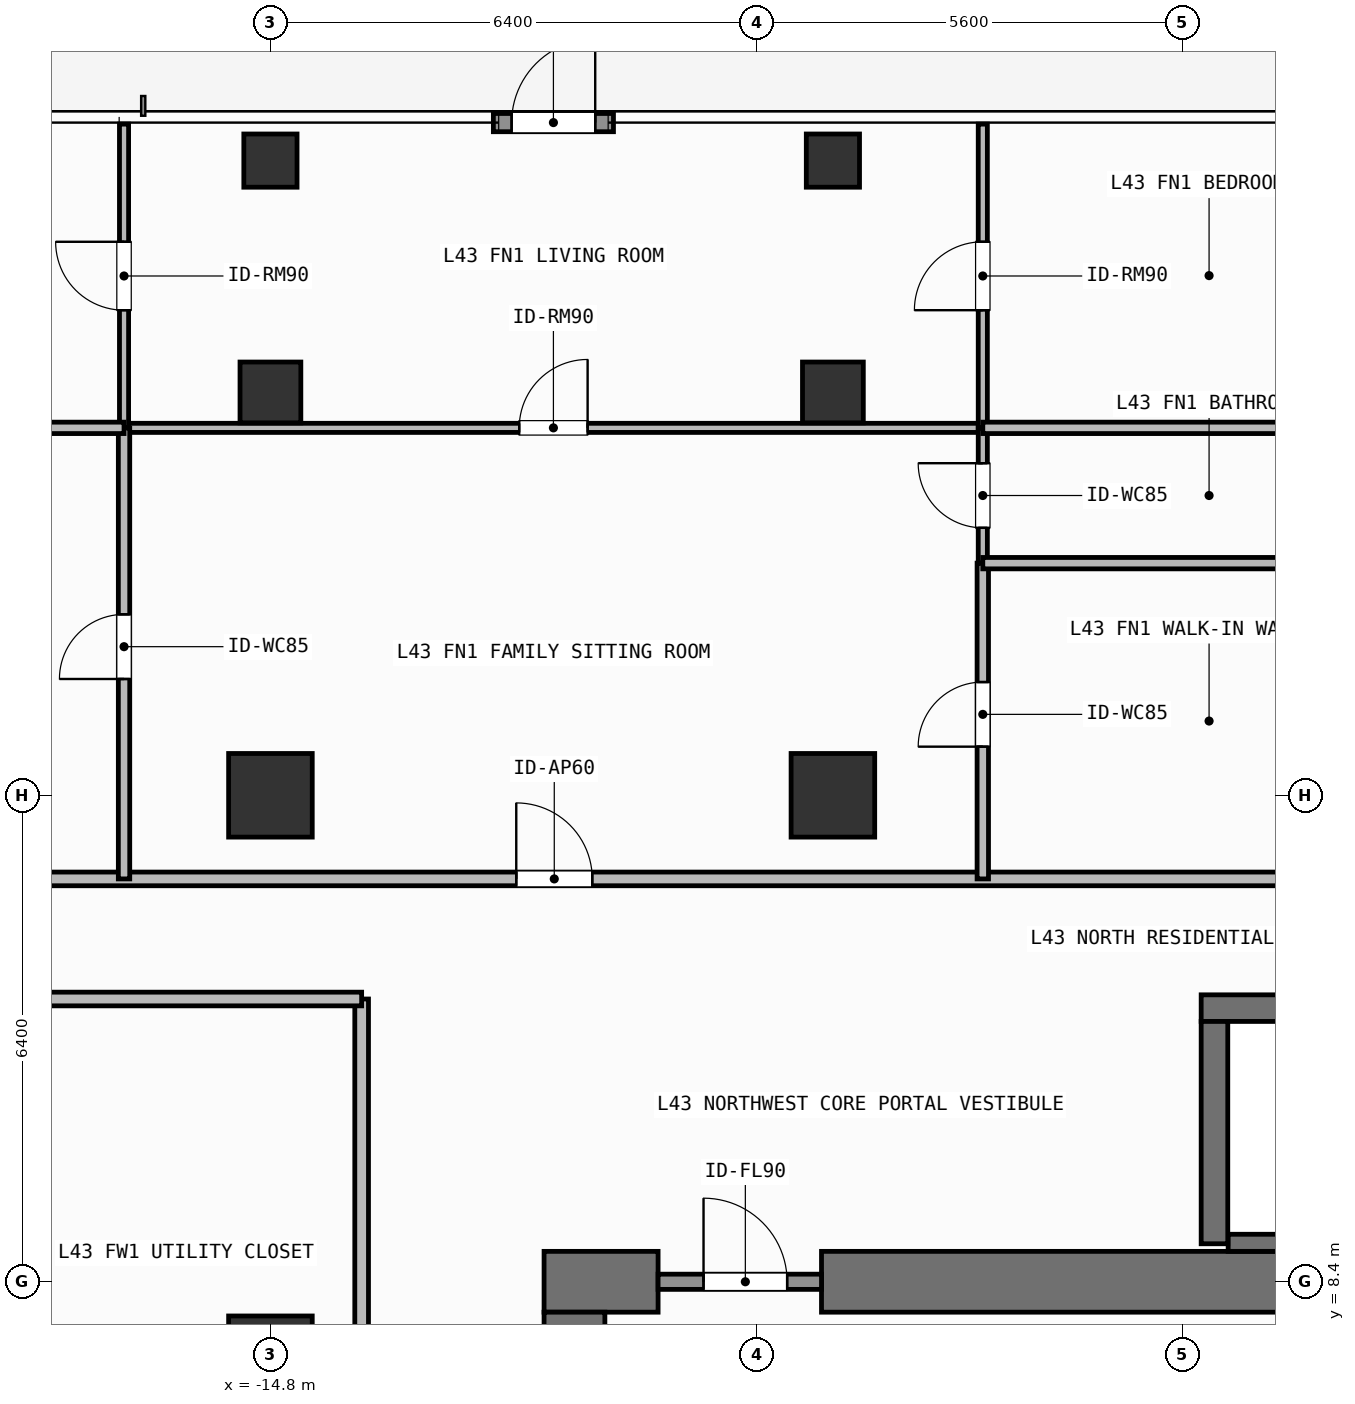
"""IFC4 building model, lengths in metres.
Left out: names, types, materials, properties, quantities, classifications, styles, units other than length and angle.
Written with IfcOpenShell. Run it as: python <this file> out.ifc"""

import sys

from ifc_helpers import new_model, si_unit, direction, frame, frame_2d, origin, origin_2d, place, context, subcontext, project, spatial, rectangle, hollow_rectangle, extrude, element, fill, save


model = new_model("IFC4")
c1 = context("Model", 3, precision=1e-05, world=origin(), true_north=direction((0.0, 1.0)))
c2 = subcontext(c1, "Body", "Model", "MODEL_VIEW")
j1 = project(units=[si_unit("LENGTHUNIT", "METRE"), si_unit("PLANEANGLEUNIT", "RADIAN")], contexts=[c1])
p1 = place(None, origin())
s1 = spatial("IfcSite", under=j1, at=p1, CompositionType="ELEMENT")
p2 = place(p1, origin())
s2 = spatial("IfcBuilding", under=s1, at=p2, CompositionType="ELEMENT")
p3 = place(p2, frame((0.0, 0.0, 175.8)))
s3 = spatial("IfcBuildingStorey", under=s2, at=p3, CompositionType="ELEMENT", Elevation=175.8)
p4 = place(p3, frame((-11.2, 8.4, 0.0), z_axis=(0.0, 0.0, 1.0), x_axis=(1.0, 0.0, 0.0)))
e1 = element("IfcWall", 1, at=p4, inside=s3, PredefinedType="SHEAR", context=c2, shape_type="SweptSolid", body=[
    extrude(rectangle(XDim=1.5, YDim=0.8, at=frame_2d((0.75, 0.0))), origin(), (0.0, 0.0, 1.0), 3.9),
])
p5 = place(p3, frame((-7.55, 8.4, 0.0), z_axis=(0.0, 0.0, 1.0), x_axis=(1.0, 0.0, 0.0)))
e2 = element("IfcWall", 2, at=p5, inside=s3, PredefinedType="SHEAR", context=c2, shape_type="SweptSolid", body=[
    extrude(rectangle(XDim=16.35, YDim=0.8, at=frame_2d((8.175, 0.0))), origin(), (0.0, 0.0, 1.0), 3.9),
])
p6 = place(p3, frame((-10.8, -8.0, 0.0), z_axis=(0.0, 0.0, 1.0), x_axis=(0.0, 1.0, 0.0)))
e3 = element("IfcWall", 3, at=p6, inside=s3, PredefinedType="SHEAR", context=c2, shape_type="SweptSolid", body=[
    extrude(rectangle(XDim=16.0, YDim=0.8, at=frame_2d((8.0, 0.0))), origin(), (0.0, 0.0, 1.0), 3.9),
])
p7 = place(p3, frame((-2.555, 12.0, 0.0), z_axis=(0.0, 0.0, 1.0), x_axis=(1.0, 0.0, 0.0)))
e4 = element("IfcWall", 4, at=p7, inside=s3, PredefinedType="SHEAR", context=c2, shape_type="SweptSolid", body=[
    extrude(rectangle(XDim=7.31, YDim=0.35, at=frame_2d((3.655, 0.0))), origin(), (0.0, 0.0, 1.0), 3.9),
])
p8 = place(p3, frame((-2.2, 8.913, 0.0), z_axis=(0.0, 0.0, 1.0), x_axis=(1.0, 0.0, 0.0)))
e5 = element("IfcWall", 5, at=p8, inside=s3, PredefinedType="SHEAR", context=c2, shape_type="SweptSolid", body=[
    extrude(rectangle(XDim=6.6, YDim=0.225, at=frame_2d((3.3, 0.0))), origin(), (0.0, 0.0, 1.0), 3.9),
])
p9 = place(p3, frame((-2.38, 8.9, 0.0), z_axis=(0.0, 0.0, 1.0), x_axis=(0.0, 1.0, 0.0)))
e6 = element("IfcWall", 6, at=p9, inside=s3, PredefinedType="SHEAR", context=c2, shape_type="SweptSolid", body=[
    extrude(rectangle(XDim=2.925, YDim=0.35, at=frame_2d((1.462, 0.0))), origin(), (0.0, 0.0, 1.0), 3.9),
])
for number, where, z_axis, x_axis in (
    (7, (-14.8, 14.8, 0.0), (0.0, 0.0, 1.0), (1.0, 0.0, 0.0)),
    (8, (-7.4, 14.8, 0.0), (0.0, 0.0, 1.0), (1.0, 0.0, 0.0)),
    (9, (-14.8, 7.4, 0.0), (0.0, 0.0, 1.0), (1.0, 0.0, 0.0)),
):
    element("IfcColumn", number, at=place(p3, frame(where, z_axis=z_axis, x_axis=x_axis)), inside=s3, PredefinedType="COLUMN", context=c2, shape_type="SweptSolid", body=[
        extrude(rectangle(XDim=1.1, YDim=1.1, at=origin_2d()), origin(), (0.0, 0.0, 1.0), 3.9),
    ])
for number, where, z_axis, x_axis in (
    (10, (-14.8, 20.1, 0.0), (0.0, 0.0, 1.0), (1.0, 0.0, 0.0)),
    (11, (-7.4, 20.1, 0.0), (0.0, 0.0, 1.0), (1.0, 0.0, 0.0)),
):
    element("IfcColumn", number, at=place(p3, frame(where, z_axis=z_axis, x_axis=x_axis)), inside=s3, PredefinedType="COLUMN", context=c2, shape_type="SweptSolid", body=[
        extrude(hollow_rectangle(XDim=0.8, YDim=0.8, WallThickness=0.036, at=origin_2d()), origin(), (0.0, 0.0, 1.0), 3.9),
    ])
for number, where, z_axis, x_axis in (
    (12, (-14.8, 23.15, 0.0), (0.0, 0.0, 1.0), (1.0, 0.0, 0.0)),
    (13, (-7.4, 23.15, 0.0), (0.0, 0.0, 1.0), (1.0, 0.0, 0.0)),
):
    element("IfcColumn", number, at=place(p3, frame(where, z_axis=z_axis, x_axis=x_axis)), inside=s3, PredefinedType="COLUMN", context=c2, shape_type="SweptSolid", body=[
        extrude(hollow_rectangle(XDim=0.7, YDim=0.7, WallThickness=0.032, at=origin_2d()), origin(), (0.0, 0.0, 1.0), 3.9),
    ])
p10 = place(p3, frame((-11.867, 23.65, 0.0), z_axis=(0.0, 0.0, 1.0), x_axis=(1.0, 0.0, 0.0)))
e14 = element("IfcWall", 14, at=p10, inside=s3, PredefinedType="SOLIDWALL", context=c2, shape_type="SweptSolid", body=[
    extrude(rectangle(XDim=1.58, YDim=0.24, at=frame_2d((0.79, 0.0))), origin(), (0.0, 0.0, 1.0), 3.68),
])
p11 = place(p10, frame((0.24, 0.0, 0.0)))
e15 = element("IfcOpeningElement", 15, at=p11, cuts=e14, PredefinedType="OPENING", context=c2, shape_type="SweptSolid", body=[
    extrude(rectangle(XDim=1.1, YDim=2.2, at=frame_2d((0.55, 1.1))), frame((0.0, 0.13, 0.0), z_axis=(0.0, -1.0, 0.0), x_axis=(1.0, 0.0, 0.0)), (0.0, 0.0, 1.0), 0.26),
])
p12 = place(p3, frame((-9.7, 8.4, 0.0), z_axis=(0.0, 0.0, 1.0), x_axis=(1.0, 0.0, 0.0)))
e16 = element("IfcWall", 16, at=p12, inside=s3, PredefinedType="SOLIDWALL", context=c2, shape_type="SweptSolid", body=[
    extrude(rectangle(XDim=2.15, YDim=0.2, at=frame_2d((1.075, 0.0))), origin(), (0.0, 0.0, 1.0), 2.82),
])
p13 = place(p12, frame((0.598, 0.0, 0.0)))
e17 = element("IfcOpeningElement", 17, at=p13, cuts=e16, PredefinedType="OPENING", context=c2, shape_type="SweptSolid", body=[
    extrude(rectangle(XDim=1.1, YDim=2.15, at=frame_2d((0.55, 1.075))), frame((0.0, 0.11, 0.0), z_axis=(0.0, -1.0, 0.0), x_axis=(1.0, 0.0, 0.0)), (0.0, 0.0, 1.0), 0.22),
])
p14 = place(p3, frame((-22.12, 13.7, 0.0), z_axis=(0.0, 0.0, 1.0), x_axis=(1.0, 0.0, 0.0)))
e18 = element("IfcWall", 18, at=p14, inside=s3, PredefinedType="PARTITIONING", context=c2, shape_type="SweptSolid", body=[
    extrude(rectangle(XDim=22.646, YDim=0.18, at=frame_2d((11.323, 0.0))), origin(), (0.0, 0.0, 1.0), 3.68),
])
p15 = place(p14, frame((10.554, 0.0, 0.0)))
e19 = element("IfcOpeningElement", 19, at=p15, cuts=e18, PredefinedType="OPENING", context=c2, shape_type="SweptSolid", body=[
    extrude(rectangle(XDim=1.0, YDim=2.2, at=frame_2d((0.5, 1.1))), frame((0.0, 0.1, 0.0), z_axis=(0.0, -1.0, 0.0), x_axis=(1.0, 0.0, 0.0)), (0.0, 0.0, 1.0), 0.2),
])
p16 = place(p3, frame((-16.726, 19.634, 0.0), z_axis=(0.0, 0.0, 1.0), x_axis=(1.0, 0.0, 0.0)))
e20 = element("IfcWall", 20, at=p16, inside=s3, PredefinedType="PARTITIONING", context=c2, shape_type="SweptSolid", body=[
    extrude(rectangle(XDim=11.298, YDim=0.12, at=frame_2d((5.649, 0.0))), origin(), (0.0, 0.0, 1.0), 3.68),
])
p17 = place(p16, frame((5.199, 0.0, 0.0)))
e21 = element("IfcOpeningElement", 21, at=p17, cuts=e20, PredefinedType="OPENING", context=c2, shape_type="SweptSolid", body=[
    extrude(rectangle(XDim=0.9, YDim=2.1, at=frame_2d((0.45, 1.05))), frame((0.0, 0.07, 0.0), z_axis=(0.0, -1.0, 0.0), x_axis=(1.0, 0.0, 0.0)), (0.0, 0.0, 1.0), 0.14),
])
p18 = place(p3, frame((-16.726, 13.7, 0.0), z_axis=(0.0, 0.0, 1.0), x_axis=(0.0, 1.0, 0.0)))
e22 = element("IfcWall", 22, at=p18, inside=s3, PredefinedType="PARTITIONING", context=c2, shape_type="SweptSolid", body=[
    extrude(rectangle(XDim=5.934, YDim=0.15, at=frame_2d((2.967, 0.0))), origin(), (0.0, 0.0, 1.0), 3.68),
])
p19 = place(p18, frame((2.63, 0.0, 0.0)))
e23 = element("IfcOpeningElement", 23, at=p19, cuts=e22, PredefinedType="OPENING", context=c2, shape_type="SweptSolid", body=[
    extrude(rectangle(XDim=0.85, YDim=2.1, at=frame_2d((0.425, 1.05))), frame((0.0, 0.085, 0.0), z_axis=(0.0, -1.0, 0.0), x_axis=(1.0, 0.0, 0.0)), (0.0, 0.0, 1.0), 0.17),
])
p20 = place(p3, frame((-16.726, 19.634, 0.0), z_axis=(0.0, 0.0, 1.0), x_axis=(0.0, 1.0, 0.0)))
e24 = element("IfcWall", 24, at=p20, inside=s3, PredefinedType="PARTITIONING", context=c2, shape_type="SweptSolid", body=[
    extrude(rectangle(XDim=3.996, YDim=0.12, at=frame_2d((1.998, 0.0))), origin(), (0.0, 0.0, 1.0), 3.68),
])
p21 = place(p20, frame((1.548, 0.0, 0.0)))
e25 = element("IfcOpeningElement", 25, at=p21, cuts=e24, PredefinedType="OPENING", context=c2, shape_type="SweptSolid", body=[
    extrude(rectangle(XDim=0.9, YDim=2.1, at=frame_2d((0.45, 1.05))), frame((0.0, 0.07, 0.0), z_axis=(0.0, -1.0, 0.0), x_axis=(1.0, 0.0, 0.0)), (0.0, 0.0, 1.0), 0.14),
])
p22 = place(p3, frame((-5.428, 13.7, 0.0), z_axis=(0.0, 0.0, 1.0), x_axis=(0.0, 1.0, 0.0)))
e26 = element("IfcWall", 26, at=p22, inside=s3, PredefinedType="PARTITIONING", context=c2, shape_type="SweptSolid", body=[
    extrude(rectangle(XDim=4.154, YDim=0.15, at=frame_2d((2.077, 0.0))), origin(), (0.0, 0.0, 1.0), 3.68),
])
p23 = place(p22, frame((1.74, 0.0, 0.0)))
e27 = element("IfcOpeningElement", 27, at=p23, cuts=e26, PredefinedType="OPENING", context=c2, shape_type="SweptSolid", body=[
    extrude(rectangle(XDim=0.85, YDim=2.1, at=frame_2d((0.425, 1.05))), frame((0.0, 0.085, 0.0), z_axis=(0.0, -1.0, 0.0), x_axis=(1.0, 0.0, 0.0)), (0.0, 0.0, 1.0), 0.17),
])
p24 = place(p3, frame((-5.428, 17.854, 0.0), z_axis=(0.0, 0.0, 1.0), x_axis=(0.0, 1.0, 0.0)))
e28 = element("IfcWall", 28, at=p24, inside=s3, PredefinedType="PARTITIONING", context=c2, shape_type="SweptSolid", body=[
    extrude(rectangle(XDim=1.78, YDim=0.12, at=frame_2d((0.89, 0.0))), origin(), (0.0, 0.0, 1.0), 3.68),
])
p25 = place(p24, frame((0.465, 0.0, 0.0)))
e29 = element("IfcOpeningElement", 29, at=p25, cuts=e28, PredefinedType="OPENING", context=c2, shape_type="SweptSolid", body=[
    extrude(rectangle(XDim=0.85, YDim=2.1, at=frame_2d((0.425, 1.05))), frame((0.0, 0.07, 0.0), z_axis=(0.0, -1.0, 0.0), x_axis=(1.0, 0.0, 0.0)), (0.0, 0.0, 1.0), 0.14),
])
p26 = place(p3, frame((-5.428, 19.634, 0.0), z_axis=(0.0, 0.0, 1.0), x_axis=(0.0, 1.0, 0.0)))
e30 = element("IfcWall", 30, at=p26, inside=s3, PredefinedType="PARTITIONING", context=c2, shape_type="SweptSolid", body=[
    extrude(rectangle(XDim=3.996, YDim=0.12, at=frame_2d((1.998, 0.0))), origin(), (0.0, 0.0, 1.0), 3.68),
])
p27 = place(p26, frame((1.548, 0.0, 0.0)))
e31 = element("IfcOpeningElement", 31, at=p27, cuts=e30, PredefinedType="OPENING", context=c2, shape_type="SweptSolid", body=[
    extrude(rectangle(XDim=0.9, YDim=2.1, at=frame_2d((0.45, 1.05))), frame((0.0, 0.07, 0.0), z_axis=(0.0, -1.0, 0.0), x_axis=(1.0, 0.0, 0.0)), (0.0, 0.0, 1.0), 0.14),
])
p28 = place(p3, frame((-13.6, -12.12, 0.0), z_axis=(0.0, 0.0, 1.0), x_axis=(0.0, 1.0, 0.0)))
e32 = element("IfcWall", 32, at=p28, inside=s3, PredefinedType="PARTITIONING", context=c2, shape_type="SweptSolid", body=[
    extrude(rectangle(XDim=24.24, YDim=0.18, at=frame_2d((12.12, 0.0))), origin(), (0.0, 0.0, 1.0), 3.68),
])
p29 = place(p28, frame((11.62, 0.0, 0.0)))
e33 = element("IfcOpeningElement", 33, at=p29, cuts=e32, PredefinedType="OPENING", context=c2, shape_type="SweptSolid", body=[
    extrude(rectangle(XDim=1.0, YDim=2.2, at=frame_2d((0.5, 1.1))), frame((0.0, 0.1, 0.0), z_axis=(0.0, -1.0, 0.0), x_axis=(1.0, 0.0, 0.0)), (0.0, 0.0, 1.0), 0.2),
])
p30 = place(p3, frame((-22.12, 19.634, 0.0), z_axis=(0.0, 0.0, 1.0), x_axis=(1.0, 0.0, 0.0)))
e34 = element("IfcWall", 34, at=p30, inside=s3, PredefinedType="PARTITIONING", context=c2, shape_type="SweptSolid", body=[
    extrude(rectangle(XDim=5.394, YDim=0.15, at=frame_2d((2.697, 0.0))), origin(), (0.0, 0.0, 1.0), 3.68),
])
for number, where, z_axis, x_axis in (
    (35, (-5.428, 17.854, 0.0), (0.0, 0.0, 1.0), (1.0, 0.0, 0.0)),
    (36, (-5.428, 19.634, 0.0), (0.0, 0.0, 1.0), (1.0, 0.0, 0.0)),
):
    element("IfcWall", number, at=place(p3, frame(where, z_axis=z_axis, x_axis=x_axis)), inside=s3, PredefinedType="PARTITIONING", context=c2, shape_type="SweptSolid", body=[
        extrude(rectangle(XDim=5.954, YDim=0.15, at=frame_2d((2.977, 0.0))), origin(), (0.0, 0.0, 1.0), 3.68),
    ])
p31 = place(p3, frame((-25.53, 12.12, 0.0), z_axis=(0.0, 0.0, 1.0), x_axis=(1.0, 0.0, 0.0)))
e37 = element("IfcWall", 37, at=p31, inside=s3, PredefinedType="PARTITIONING", context=c2, shape_type="SweptSolid", body=[
    extrude(rectangle(XDim=11.93, YDim=0.18, at=frame_2d((5.965, 0.0))), origin(), (0.0, 0.0, 1.0), 3.68),
])
p32 = place(p11, origin())
e38 = element("IfcDoor", 38, at=p32, inside=s3, OperationType="SINGLE_SWING_RIGHT", PredefinedType="DOOR", context=c2, shape_type="SweptSolid", body=[
    extrude(rectangle(XDim=1.1, YDim=2.2, at=frame_2d((0.55, 1.1))), frame((0.0, 0.025, 0.0), z_axis=(0.0, -1.0, 0.0), x_axis=(1.0, 0.0, 0.0)), (0.0, 0.0, 1.0), 0.05),
])
fill(e15, e38)
p33 = place(p13, origin())
e39 = element("IfcDoor", 39, at=p33, inside=s3, OperationType="SINGLE_SWING_LEFT", PredefinedType="DOOR", context=c2, shape_type="SweptSolid", body=[
    extrude(rectangle(XDim=1.1, YDim=2.15, at=frame_2d((0.55, 1.075))), frame((0.0, 0.025, 0.0), z_axis=(0.0, -1.0, 0.0), x_axis=(1.0, 0.0, 0.0)), (0.0, 0.0, 1.0), 0.05),
])
fill(e17, e39)
p34 = place(p15, origin())
e40 = element("IfcDoor", 40, at=p34, inside=s3, OperationType="SINGLE_SWING_LEFT", PredefinedType="DOOR", context=c2, shape_type="SweptSolid", body=[
    extrude(rectangle(XDim=1.0, YDim=2.2, at=frame_2d((0.5, 1.1))), frame((0.0, 0.025, 0.0), z_axis=(0.0, -1.0, 0.0), x_axis=(1.0, 0.0, 0.0)), (0.0, 0.0, 1.0), 0.05),
])
fill(e19, e40)
p35 = place(p17, origin())
e41 = element("IfcDoor", 41, at=p35, inside=s3, OperationType="SINGLE_SWING_RIGHT", PredefinedType="DOOR", context=c2, shape_type="SweptSolid", body=[
    extrude(rectangle(XDim=0.9, YDim=2.1, at=frame_2d((0.45, 1.05))), frame((0.0, 0.025, 0.0), z_axis=(0.0, -1.0, 0.0), x_axis=(1.0, 0.0, 0.0)), (0.0, 0.0, 1.0), 0.05),
])
fill(e21, e41)
p36 = place(p19, origin())
e42 = element("IfcDoor", 42, at=p36, inside=s3, OperationType="SINGLE_SWING_LEFT", PredefinedType="DOOR", context=c2, shape_type="SweptSolid", body=[
    extrude(rectangle(XDim=0.85, YDim=2.1, at=frame_2d((0.425, 1.05))), frame((0.0, 0.025, 0.0), z_axis=(0.0, -1.0, 0.0), x_axis=(1.0, 0.0, 0.0)), (0.0, 0.0, 1.0), 0.05),
])
fill(e23, e42)
p37 = place(p21, origin())
e43 = element("IfcDoor", 43, at=p37, inside=s3, OperationType="SINGLE_SWING_RIGHT", PredefinedType="DOOR", context=c2, shape_type="SweptSolid", body=[
    extrude(rectangle(XDim=0.9, YDim=2.1, at=frame_2d((0.45, 1.05))), frame((0.0, 0.025, 0.0), z_axis=(0.0, -1.0, 0.0), x_axis=(1.0, 0.0, 0.0)), (0.0, 0.0, 1.0), 0.05),
])
fill(e25, e43)
p38 = place(p23, origin())
e44 = element("IfcDoor", 44, at=p38, inside=s3, OperationType="SINGLE_SWING_LEFT", PredefinedType="DOOR", context=c2, shape_type="SweptSolid", body=[
    extrude(rectangle(XDim=0.85, YDim=2.1, at=frame_2d((0.425, 1.05))), frame((0.0, 0.025, 0.0), z_axis=(0.0, -1.0, 0.0), x_axis=(1.0, 0.0, 0.0)), (0.0, 0.0, 1.0), 0.05),
])
fill(e27, e44)
p39 = place(p25, origin())
e45 = element("IfcDoor", 45, at=p39, inside=s3, OperationType="SINGLE_SWING_RIGHT", PredefinedType="DOOR", context=c2, shape_type="SweptSolid", body=[
    extrude(rectangle(XDim=0.85, YDim=2.1, at=frame_2d((0.425, 1.05))), frame((0.0, 0.025, 0.0), z_axis=(0.0, -1.0, 0.0), x_axis=(1.0, 0.0, 0.0)), (0.0, 0.0, 1.0), 0.05),
])
fill(e29, e45)
p40 = place(p27, origin())
e46 = element("IfcDoor", 46, at=p40, inside=s3, OperationType="SINGLE_SWING_LEFT", PredefinedType="DOOR", context=c2, shape_type="SweptSolid", body=[
    extrude(rectangle(XDim=0.9, YDim=2.1, at=frame_2d((0.45, 1.05))), frame((0.0, 0.025, 0.0), z_axis=(0.0, -1.0, 0.0), x_axis=(1.0, 0.0, 0.0)), (0.0, 0.0, 1.0), 0.05),
])
fill(e31, e46)
save(model, sys.argv[1])
